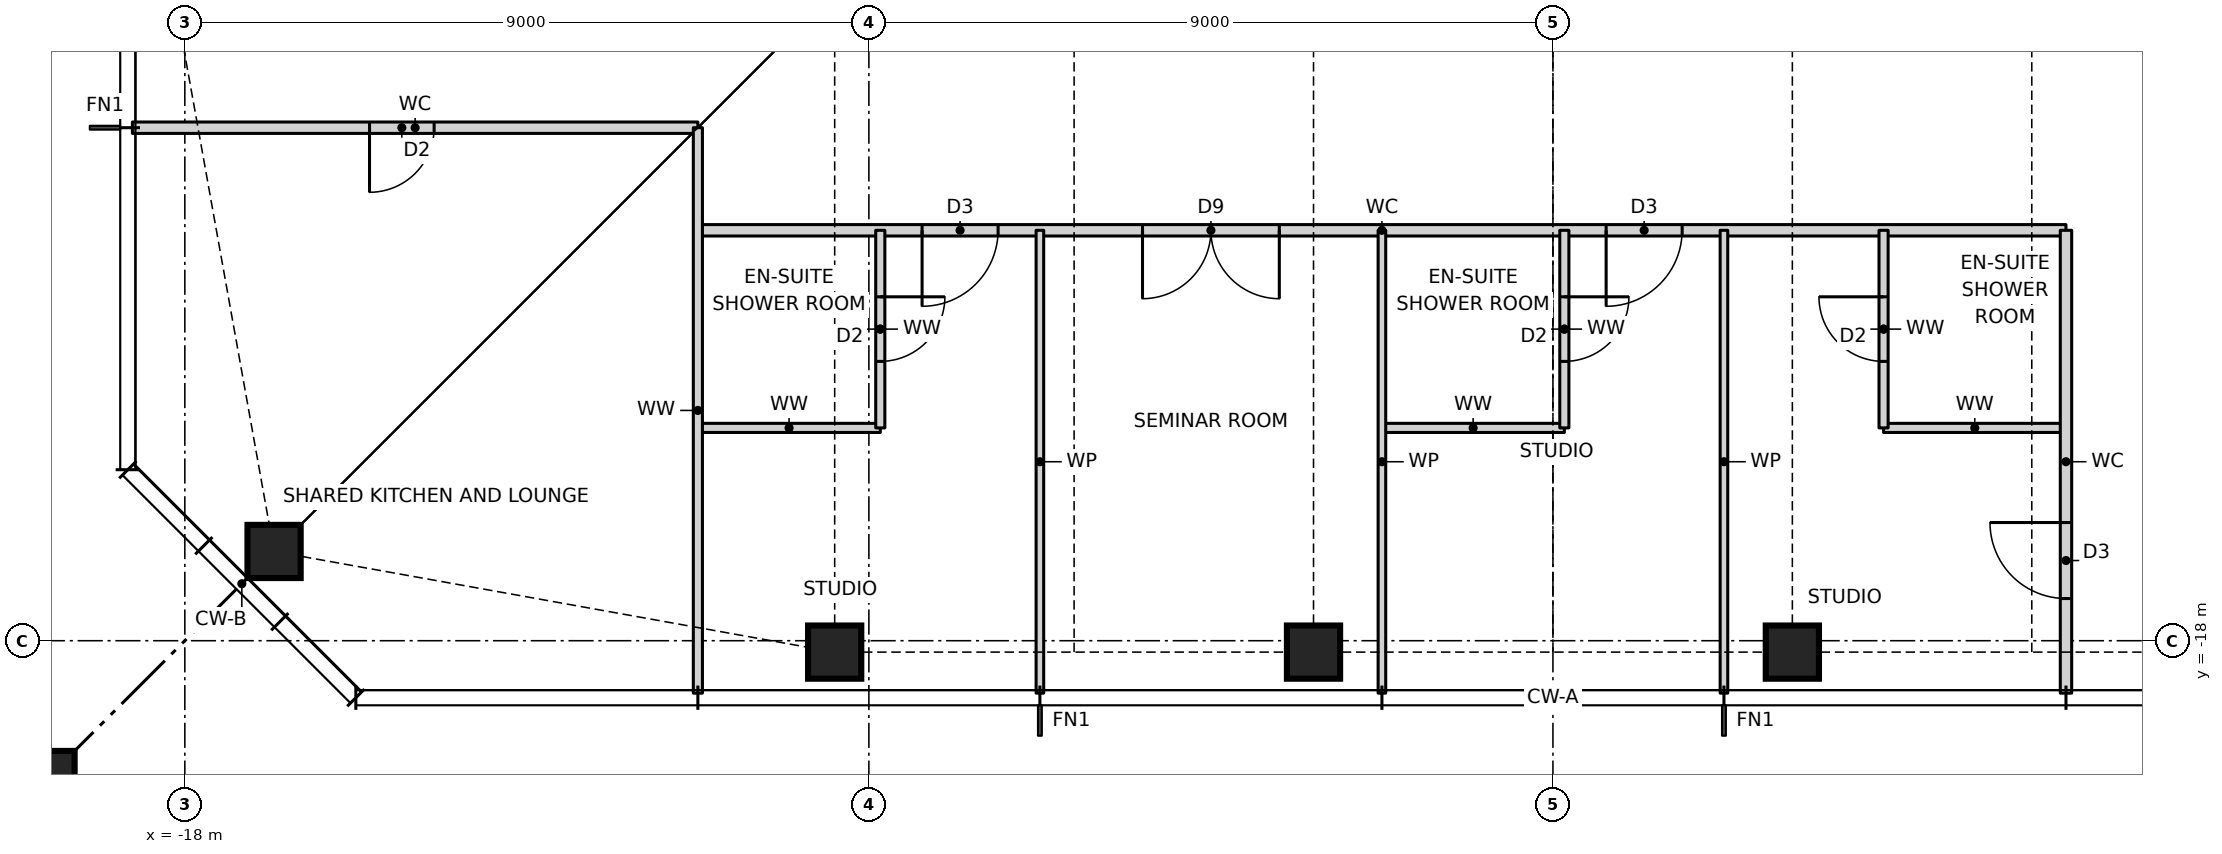
"""IFC4 building model, lengths in metres.
Left out: names, types, materials, properties, quantities, classifications, styles, units other than length and angle.
Written with IfcOpenShell. Run it as: python <this file> out.ifc"""

import sys

from ifc_helpers import new_model, si_unit, direction, frame, frame_2d, origin, origin_2d, place, context, subcontext, project, spatial, rectangle, hollow_rectangle, i_section, extrude, element, fill, save


model = new_model("IFC4")
c1 = context("Model", 3, precision=1e-05, world=origin(), true_north=direction((0.0, 1.0)))
c2 = subcontext(c1, "Body", "Model", "MODEL_VIEW")
j1 = project(units=[si_unit("LENGTHUNIT", "METRE"), si_unit("PLANEANGLEUNIT", "RADIAN")], contexts=[c1])
p1 = place(None, origin())
s1 = spatial("IfcSite", under=j1, at=p1, CompositionType="ELEMENT")
p2 = place(p1, origin())
s2 = spatial("IfcBuilding", under=s1, at=p2, CompositionType="ELEMENT")
p3 = place(p2, frame((0.0, 0.0, 160.0)))
s3 = spatial("IfcBuildingStorey", under=s2, at=p3, CompositionType="ELEMENT", Elevation=160.0)
for number, where, z_axis, x_axis in (
    (1, (-16.826, -16.826, 0.0), (0.0, 0.0, 1.0), (1.0, 0.0, 0.0)),
    (2, (-9.45, -18.15, 0.0), (0.0, 0.0, 1.0), (1.0, 0.0, 0.0)),
    (3, (-3.15, -18.15, 0.0), (0.0, 0.0, 1.0), (1.0, 0.0, 0.0)),
    (4, (3.15, -18.15, 0.0), (0.0, 0.0, 1.0), (1.0, 0.0, 0.0)),
):
    element("IfcColumn", number, at=place(p3, frame(where, z_axis=z_axis, x_axis=x_axis)), inside=s3, PredefinedType="COLUMN", context=c2, shape_type="SweptSolid", body=[
        extrude(hollow_rectangle(XDim=0.7, YDim=0.7, WallThickness=0.06, at=origin_2d()), origin(), (0.0, 0.0, 1.0), 3.5),
    ])
p4 = place(p3, frame((-21.65, -21.65, 0.0), z_axis=(0.0, 0.0, 1.0), x_axis=(1.0, 0.0, 0.0)))
e5 = element("IfcColumn", 5, at=p4, inside=s3, PredefinedType="COLUMN", context=c2, shape_type="SweptSolid", body=[
    extrude(rectangle(XDim=4.4, YDim=4.4, at=origin_2d()), origin(), (0.0, 0.0, 1.0), 3.5),
    extrude(i_section(OverallWidth=0.478, OverallDepth=0.599, WebThickness=0.1, FlangeThickness=0.14, at=origin_2d()), origin(), (0.0, 0.0, 1.0), 3.5),
])
for number, where, z_axis, x_axis in (
    (6, (-11.25, -15.2, 0.0), (0.0, 0.0, 1.0), (1.0, 0.0, 0.0)),
    (7, (-2.25, -15.2, 0.0), (0.0, 0.0, 1.0), (1.0, 0.0, 0.0)),
    (8, (4.35, -15.2, 0.0), (0.0, 0.0, 1.0), (1.0, 0.0, 0.0)),
):
    element("IfcWall", number, at=place(p3, frame(where, z_axis=z_axis, x_axis=x_axis)), inside=s3, PredefinedType="PARTITIONING", context=c2, shape_type="SweptSolid", body=[
        extrude(rectangle(XDim=2.4, YDim=0.12, at=frame_2d((1.2, 0.0))), origin(), (0.0, 0.0, 1.0), 3.27),
    ])
p5 = place(p3, frame((-11.25, -12.6, 0.0), z_axis=(0.0, 0.0, 1.0), x_axis=(1.0, 0.0, 0.0)))
e9 = element("IfcWall", 9, at=p5, inside=s3, PredefinedType="PARTITIONING", context=c2, shape_type="SweptSolid", body=[
    extrude(rectangle(XDim=18.0, YDim=0.15, at=frame_2d((9.0, 0.0))), origin(), (0.0, 0.0, 1.0), 3.27),
])
p6 = place(p5, frame((2.95, 0.0, 0.0)))
e10 = element("IfcOpeningElement", 10, at=p6, cuts=e9, PredefinedType="OPENING", context=c2, shape_type="SweptSolid", body=[
    extrude(rectangle(XDim=1.0, YDim=2.1, at=frame_2d((0.5, 1.05))), frame((0.0, 0.085, 0.0), z_axis=(0.0, -1.0, 0.0), x_axis=(1.0, 0.0, 0.0)), (0.0, 0.0, 1.0), 0.17),
])
p7 = place(p5, frame((5.85, 0.0, 0.0)))
e11 = element("IfcOpeningElement", 11, at=p7, cuts=e9, PredefinedType="OPENING", context=c2, shape_type="SweptSolid", body=[
    extrude(rectangle(XDim=1.8, YDim=2.1, at=frame_2d((0.9, 1.05))), frame((0.0, 0.085, 0.0), z_axis=(0.0, -1.0, 0.0), x_axis=(1.0, 0.0, 0.0)), (0.0, 0.0, 1.0), 0.17),
])
p8 = place(p5, frame((11.95, 0.0, 0.0)))
e12 = element("IfcOpeningElement", 12, at=p8, cuts=e9, PredefinedType="OPENING", context=c2, shape_type="SweptSolid", body=[
    extrude(rectangle(XDim=1.0, YDim=2.1, at=frame_2d((0.5, 1.05))), frame((0.0, 0.085, 0.0), z_axis=(0.0, -1.0, 0.0), x_axis=(1.0, 0.0, 0.0)), (0.0, 0.0, 1.0), 0.17),
])
p9 = place(p3, frame((-18.69, -11.25, 0.0), z_axis=(0.0, 0.0, 1.0), x_axis=(1.0, 0.0, 0.0)))
e13 = element("IfcWall", 13, at=p9, inside=s3, PredefinedType="PARTITIONING", context=c2, shape_type="SweptSolid", body=[
    extrude(rectangle(XDim=7.44, YDim=0.15, at=frame_2d((3.72, 0.0))), origin(), (0.0, 0.0, 1.0), 3.27),
])
p10 = place(p9, frame((3.12, 0.0, 0.0)))
e14 = element("IfcOpeningElement", 14, at=p10, cuts=e13, PredefinedType="OPENING", context=c2, shape_type="SweptSolid", body=[
    extrude(rectangle(XDim=0.85, YDim=2.1, at=frame_2d((0.425, 1.05))), frame((0.0, 0.085, 0.0), z_axis=(0.0, -1.0, 0.0), x_axis=(1.0, 0.0, 0.0)), (0.0, 0.0, 1.0), 0.17),
])
p11 = place(p3, frame((6.75, -18.69, 0.0), z_axis=(0.0, 0.0, 1.0), x_axis=(0.0, 1.0, 0.0)))
e15 = element("IfcWall", 15, at=p11, inside=s3, PredefinedType="PARTITIONING", context=c2, shape_type="SweptSolid", body=[
    extrude(rectangle(XDim=6.09, YDim=0.15, at=frame_2d((3.045, 0.0))), origin(), (0.0, 0.0, 1.0), 3.27),
])
p12 = place(p11, frame((1.245, 0.0, 0.0)))
e16 = element("IfcOpeningElement", 16, at=p12, cuts=e15, PredefinedType="OPENING", context=c2, shape_type="SweptSolid", body=[
    extrude(rectangle(XDim=1.0, YDim=2.1, at=frame_2d((0.5, 1.05))), frame((0.0, 0.085, 0.0), z_axis=(0.0, -1.0, 0.0), x_axis=(1.0, 0.0, 0.0)), (0.0, 0.0, 1.0), 0.17),
])
p13 = place(p3, frame((4.35, -15.2, 0.0), z_axis=(0.0, 0.0, 1.0), x_axis=(0.0, 1.0, 0.0)))
e17 = element("IfcWall", 17, at=p13, inside=s3, PredefinedType="PARTITIONING", context=c2, shape_type="SweptSolid", body=[
    extrude(rectangle(XDim=2.6, YDim=0.12, at=frame_2d((1.3, 0.0))), origin(), (0.0, 0.0, 1.0), 3.27),
])
p14 = place(p13, frame((0.875, 0.0, 0.0)))
e18 = element("IfcOpeningElement", 18, at=p14, cuts=e17, PredefinedType="OPENING", context=c2, shape_type="SweptSolid", body=[
    extrude(rectangle(XDim=0.85, YDim=2.1, at=frame_2d((0.425, 1.05))), frame((0.0, 0.07, 0.0), z_axis=(0.0, -1.0, 0.0), x_axis=(1.0, 0.0, 0.0)), (0.0, 0.0, 1.0), 0.14),
])
p15 = place(p3, frame((2.25, -18.69, 0.0), z_axis=(0.0, 0.0, 1.0), x_axis=(0.0, 1.0, 0.0)))
e19 = element("IfcWall", 19, at=p15, inside=s3, PredefinedType="PARTITIONING", context=c2, shape_type="SweptSolid", body=[
    extrude(rectangle(XDim=6.09, YDim=0.1, at=frame_2d((3.045, 0.0))), origin(), (0.0, 0.0, 1.0), 3.27),
])
p16 = place(p3, frame((0.15, -15.2, 0.0), z_axis=(0.0, 0.0, 1.0), x_axis=(0.0, 1.0, 0.0)))
e20 = element("IfcWall", 20, at=p16, inside=s3, PredefinedType="PARTITIONING", context=c2, shape_type="SweptSolid", body=[
    extrude(rectangle(XDim=2.6, YDim=0.12, at=frame_2d((1.3, 0.0))), origin(), (0.0, 0.0, 1.0), 3.27),
])
p17 = place(p16, frame((0.875, 0.0, 0.0)))
e21 = element("IfcOpeningElement", 21, at=p17, cuts=e20, PredefinedType="OPENING", context=c2, shape_type="SweptSolid", body=[
    extrude(rectangle(XDim=0.85, YDim=2.1, at=frame_2d((0.425, 1.05))), frame((0.0, 0.07, 0.0), z_axis=(0.0, -1.0, 0.0), x_axis=(1.0, 0.0, 0.0)), (0.0, 0.0, 1.0), 0.14),
])
for number, where, z_axis, x_axis in (
    (22, (-2.25, -18.69, 0.0), (0.0, 0.0, 1.0), (0.0, 1.0, 0.0)),
    (23, (-6.75, -18.69, 0.0), (0.0, 0.0, 1.0), (0.0, 1.0, 0.0)),
):
    element("IfcWall", number, at=place(p3, frame(where, z_axis=z_axis, x_axis=x_axis)), inside=s3, PredefinedType="PARTITIONING", context=c2, shape_type="SweptSolid", body=[
        extrude(rectangle(XDim=6.09, YDim=0.1, at=frame_2d((3.045, 0.0))), origin(), (0.0, 0.0, 1.0), 3.27),
    ])
p18 = place(p3, frame((-8.85, -15.2, 0.0), z_axis=(0.0, 0.0, 1.0), x_axis=(0.0, 1.0, 0.0)))
e24 = element("IfcWall", 24, at=p18, inside=s3, PredefinedType="PARTITIONING", context=c2, shape_type="SweptSolid", body=[
    extrude(rectangle(XDim=2.6, YDim=0.12, at=frame_2d((1.3, 0.0))), origin(), (0.0, 0.0, 1.0), 3.27),
])
p19 = place(p18, frame((0.875, 0.0, 0.0)))
e25 = element("IfcOpeningElement", 25, at=p19, cuts=e24, PredefinedType="OPENING", context=c2, shape_type="SweptSolid", body=[
    extrude(rectangle(XDim=0.85, YDim=2.1, at=frame_2d((0.425, 1.05))), frame((0.0, 0.07, 0.0), z_axis=(0.0, -1.0, 0.0), x_axis=(1.0, 0.0, 0.0)), (0.0, 0.0, 1.0), 0.14),
])
p20 = place(p3, frame((-11.25, -18.69, 0.0), z_axis=(0.0, 0.0, 1.0), x_axis=(0.0, 1.0, 0.0)))
e26 = element("IfcWall", 26, at=p20, inside=s3, PredefinedType="PARTITIONING", context=c2, shape_type="SweptSolid", body=[
    extrude(rectangle(XDim=7.44, YDim=0.12, at=frame_2d((3.72, 0.0))), origin(), (0.0, 0.0, 1.0), 3.27),
])
p21 = place(p6, frame((1.0, 0.0, 0.0), z_axis=(0.0, 0.0, 1.0), x_axis=(-1.0, 0.0, 0.0)))
e27 = element("IfcDoor", 27, at=p21, inside=s3, OperationType="SINGLE_SWING_RIGHT", PredefinedType="DOOR", context=c2, shape_type="SweptSolid", body=[
    extrude(rectangle(XDim=1.0, YDim=2.1, at=frame_2d((0.5, 1.05))), frame((0.0, 0.025, 0.0), z_axis=(0.0, -1.0, 0.0), x_axis=(1.0, 0.0, 0.0)), (0.0, 0.0, 1.0), 0.05),
])
fill(e10, e27)
p22 = place(p19, frame((0.85, 0.0, 0.0), z_axis=(0.0, 0.0, 1.0), x_axis=(-1.0, 0.0, 0.0)))
e28 = element("IfcDoor", 28, at=p22, inside=s3, OperationType="SINGLE_SWING_LEFT", PredefinedType="DOOR", context=c2, shape_type="SweptSolid", body=[
    extrude(rectangle(XDim=0.85, YDim=2.1, at=frame_2d((0.425, 1.05))), frame((0.0, 0.025, 0.0), z_axis=(0.0, -1.0, 0.0), x_axis=(1.0, 0.0, 0.0)), (0.0, 0.0, 1.0), 0.05),
])
fill(e25, e28)
p23 = place(p7, frame((1.8, 0.0, 0.0), z_axis=(0.0, 0.0, 1.0), x_axis=(-1.0, 0.0, 0.0)))
e29 = element("IfcDoor", 29, at=p23, inside=s3, OperationType="DOUBLE_DOOR_SINGLE_SWING", PredefinedType="DOOR", context=c2, shape_type="SweptSolid", body=[
    extrude(rectangle(XDim=1.8, YDim=2.1, at=frame_2d((0.9, 1.05))), frame((0.0, 0.025, 0.0), z_axis=(0.0, -1.0, 0.0), x_axis=(1.0, 0.0, 0.0)), (0.0, 0.0, 1.0), 0.05),
])
fill(e11, e29)
p24 = place(p8, frame((1.0, 0.0, 0.0), z_axis=(0.0, 0.0, 1.0), x_axis=(-1.0, 0.0, 0.0)))
e30 = element("IfcDoor", 30, at=p24, inside=s3, OperationType="SINGLE_SWING_RIGHT", PredefinedType="DOOR", context=c2, shape_type="SweptSolid", body=[
    extrude(rectangle(XDim=1.0, YDim=2.1, at=frame_2d((0.5, 1.05))), frame((0.0, 0.025, 0.0), z_axis=(0.0, -1.0, 0.0), x_axis=(1.0, 0.0, 0.0)), (0.0, 0.0, 1.0), 0.05),
])
fill(e12, e30)
p25 = place(p17, frame((0.85, 0.0, 0.0), z_axis=(0.0, 0.0, 1.0), x_axis=(-1.0, 0.0, 0.0)))
e31 = element("IfcDoor", 31, at=p25, inside=s3, OperationType="SINGLE_SWING_LEFT", PredefinedType="DOOR", context=c2, shape_type="SweptSolid", body=[
    extrude(rectangle(XDim=0.85, YDim=2.1, at=frame_2d((0.425, 1.05))), frame((0.0, 0.025, 0.0), z_axis=(0.0, -1.0, 0.0), x_axis=(1.0, 0.0, 0.0)), (0.0, 0.0, 1.0), 0.05),
])
fill(e21, e31)
p26 = place(p12, origin())
e32 = element("IfcDoor", 32, at=p26, inside=s3, OperationType="SINGLE_SWING_RIGHT", PredefinedType="DOOR", context=c2, shape_type="SweptSolid", body=[
    extrude(rectangle(XDim=1.0, YDim=2.1, at=frame_2d((0.5, 1.05))), frame((0.0, 0.025, 0.0), z_axis=(0.0, -1.0, 0.0), x_axis=(1.0, 0.0, 0.0)), (0.0, 0.0, 1.0), 0.05),
])
fill(e16, e32)
p27 = place(p14, origin())
e33 = element("IfcDoor", 33, at=p27, inside=s3, OperationType="SINGLE_SWING_RIGHT", PredefinedType="DOOR", context=c2, shape_type="SweptSolid", body=[
    extrude(rectangle(XDim=0.85, YDim=2.1, at=frame_2d((0.425, 1.05))), frame((0.0, 0.025, 0.0), z_axis=(0.0, -1.0, 0.0), x_axis=(1.0, 0.0, 0.0)), (0.0, 0.0, 1.0), 0.05),
])
fill(e18, e33)
p28 = place(p10, frame((0.85, 0.0, 0.0), z_axis=(0.0, 0.0, 1.0), x_axis=(-1.0, 0.0, 0.0)))
e34 = element("IfcDoor", 34, at=p28, inside=s3, OperationType="SINGLE_SWING_RIGHT", PredefinedType="DOOR", context=c2, shape_type="SweptSolid", body=[
    extrude(rectangle(XDim=0.85, YDim=2.1, at=frame_2d((0.425, 1.05))), frame((0.0, 0.025, 0.0), z_axis=(0.0, -1.0, 0.0), x_axis=(1.0, 0.0, 0.0)), (0.0, 0.0, 1.0), 0.05),
])
fill(e14, e34)
save(model, sys.argv[1])
